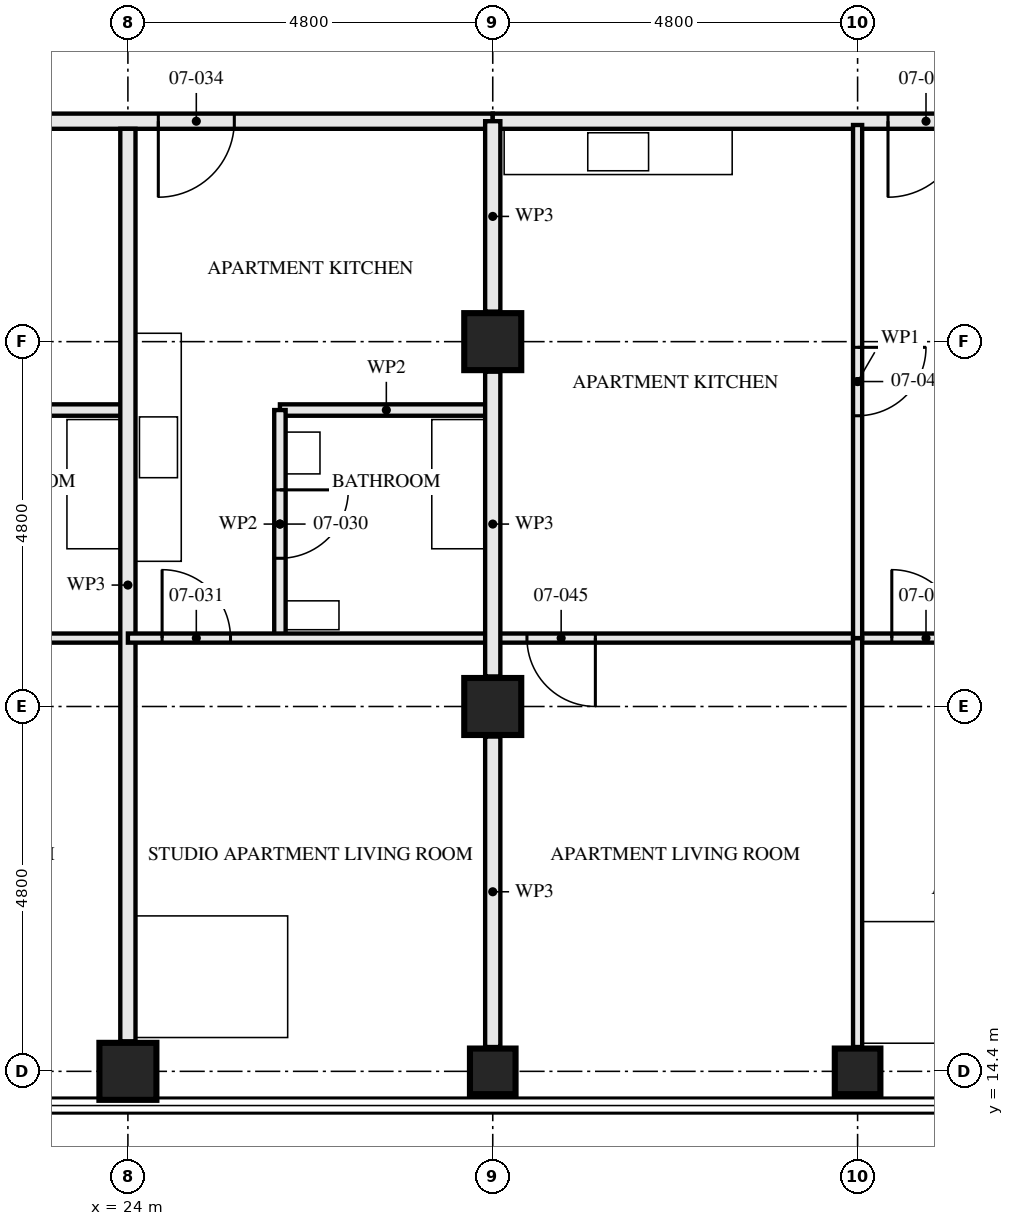
"""IFC4 building model, lengths in metres.
Left out: names, types, materials, properties, quantities, classifications, styles, units other than length and angle.
Written with IfcOpenShell. Run it as: python <this file> out.ifc"""

import sys

from ifc_helpers import new_model, si_unit, direction, frame, frame_2d, origin, origin_2d, place, context, subcontext, project, spatial, rectangle, hollow_rectangle, extrude, element, fill, save


model = new_model("IFC4")
c1 = context("Model", 3, precision=1e-05, world=origin(), true_north=direction((0.0, 1.0)))
c2 = subcontext(c1, "Body", "Model", "MODEL_VIEW")
j1 = project(units=[si_unit("LENGTHUNIT", "METRE"), si_unit("PLANEANGLEUNIT", "RADIAN")], contexts=[c1])
p1 = place(None, origin())
s1 = spatial("IfcSite", under=j1, at=p1, CompositionType="ELEMENT")
p2 = place(p1, origin())
s2 = spatial("IfcBuilding", under=s1, at=p2, CompositionType="ELEMENT")
p3 = place(p2, frame((0.0, 0.0, 30.5)))
s3 = spatial("IfcBuildingStorey", under=s2, at=p3, CompositionType="ELEMENT", Elevation=30.5)
p4 = place(p3, frame((24.0, 14.4, 0.0), z_axis=(0.0, 0.0, 1.0), x_axis=(0.0, 1.0, 0.0)))
e1 = element("IfcColumn", 1, at=p4, inside=s3, PredefinedType="COLUMN", context=c2, shape_type="SweptSolid", body=[
    extrude(hollow_rectangle(XDim=0.75, YDim=0.75, WallThickness=0.08, at=origin_2d()), origin(), (0.0, 0.0, 1.0), 3.5),
])
p5 = place(p3, frame((28.8, 14.4, 0.0), z_axis=(0.0, 0.0, 1.0), x_axis=(0.0, 1.0, 0.0)))
e2 = element("IfcColumn", 2, at=p5, inside=s3, PredefinedType="COLUMN", context=c2, shape_type="SweptSolid", body=[
    extrude(hollow_rectangle(XDim=0.6, YDim=0.6, WallThickness=0.08, at=origin_2d()), origin(), (0.0, 0.0, 1.0), 3.5),
])
for number, where, z_axis, x_axis in (
    (3, (28.8, 19.2, 0.0), (0.0, 0.0, 1.0), (1.0, 0.0, 0.0)),
    (4, (28.8, 24.0, 0.0), (0.0, 0.0, 1.0), (1.0, 0.0, 0.0)),
):
    element("IfcColumn", number, at=place(p3, frame(where, z_axis=z_axis, x_axis=x_axis)), inside=s3, PredefinedType="COLUMN", context=c2, shape_type="SweptSolid", body=[
        extrude(hollow_rectangle(XDim=0.75, YDim=0.75, WallThickness=0.08, at=origin_2d()), origin(), (0.0, 0.0, 1.0), 3.5),
    ])
p6 = place(p3, frame((33.6, 14.4, 0.0), z_axis=(0.0, 0.0, 1.0), x_axis=(0.0, 1.0, 0.0)))
e5 = element("IfcColumn", 5, at=p6, inside=s3, PredefinedType="COLUMN", context=c2, shape_type="SweptSolid", body=[
    extrude(hollow_rectangle(XDim=0.6, YDim=0.6, WallThickness=0.08, at=origin_2d()), origin(), (0.0, 0.0, 1.0), 3.5),
])
p7 = place(p3, frame((21.2, 23.1, 0.0), z_axis=(0.0, 0.0, 1.0), x_axis=(1.0, 0.0, 0.0)))
e6 = element("IfcWall", 6, at=p7, inside=s3, PredefinedType="PARTITIONING", context=c2, shape_type="SweptSolid", body=[
    extrude(rectangle(XDim=2.8, YDim=0.15, at=frame_2d((1.4, 0.0))), origin(), (0.0, 0.0, 1.0), 3.33),
])
p8 = place(p3, frame((19.2, 20.1, 0.0), z_axis=(0.0, 0.0, 1.0), x_axis=(1.0, 0.0, 0.0)))
e7 = element("IfcWall", 7, at=p8, inside=s3, PredefinedType="PARTITIONING", context=c2, shape_type="SweptSolid", body=[
    extrude(rectangle(XDim=4.8, YDim=0.12, at=frame_2d((2.4, 0.0))), origin(), (0.0, 0.0, 1.0), 3.33),
])
p9 = place(p8, frame((0.45, 0.0, 0.0)))
e8 = element("IfcOpeningElement", 8, at=p9, cuts=e7, PredefinedType="OPENING", context=c2, shape_type="SweptSolid", body=[
    extrude(rectangle(XDim=0.9, YDim=2.1, at=frame_2d((0.45, 1.05))), frame((0.0, 0.071, 0.0), z_axis=(0.0, -1.0, 0.0), x_axis=(1.0, 0.0, 0.0)), (0.0, 0.0, 1.0), 0.141),
])
p10 = place(p3, frame((24.0, 14.795, 0.0), z_axis=(0.0, 0.0, 1.0), x_axis=(0.0, 1.0, 0.0)))
e9 = element("IfcWall", 9, at=p10, inside=s3, PredefinedType="PARTITIONING", context=c2, shape_type="SweptSolid", body=[
    extrude(rectangle(XDim=12.005, YDim=0.2, at=frame_2d((6.002, 0.0))), origin(), (0.0, 0.0, 1.0), 2.55),
])
p11 = place(p3, frame((26.0, 20.1, 0.0), z_axis=(0.0, 0.0, 1.0), x_axis=(0.0, 1.0, 0.0)))
e10 = element("IfcWall", 10, at=p11, inside=s3, PredefinedType="PARTITIONING", context=c2, shape_type="SweptSolid", body=[
    extrude(rectangle(XDim=3.0, YDim=0.15, at=frame_2d((1.5, 0.0))), origin(), (0.0, 0.0, 1.0), 3.33),
])
p12 = place(p11, frame((1.05, 0.0, 0.0)))
e11 = element("IfcOpeningElement", 11, at=p12, cuts=e10, PredefinedType="OPENING", context=c2, shape_type="SweptSolid", body=[
    extrude(rectangle(XDim=0.9, YDim=2.1, at=frame_2d((0.45, 1.05))), frame((0.0, 0.085, 0.0), z_axis=(0.0, -1.0, 0.0), x_axis=(1.0, 0.0, 0.0)), (0.0, 0.0, 1.0), 0.171),
])
p13 = place(p3, frame((26.0, 23.1, 0.0), z_axis=(0.0, 0.0, 1.0), x_axis=(1.0, 0.0, 0.0)))
e12 = element("IfcWall", 12, at=p13, inside=s3, PredefinedType="PARTITIONING", context=c2, shape_type="SweptSolid", body=[
    extrude(rectangle(XDim=2.8, YDim=0.15, at=frame_2d((1.4, 0.0))), origin(), (0.0, 0.0, 1.0), 3.33),
])
p14 = place(p3, frame((24.0, 20.1, 0.0), z_axis=(0.0, 0.0, 1.0), x_axis=(1.0, 0.0, 0.0)))
e13 = element("IfcWall", 13, at=p14, inside=s3, PredefinedType="PARTITIONING", context=c2, shape_type="SweptSolid", body=[
    extrude(rectangle(XDim=4.8, YDim=0.12, at=frame_2d((2.4, 0.0))), origin(), (0.0, 0.0, 1.0), 3.33),
])
p15 = place(p14, frame((0.45, 0.0, 0.0)))
e14 = element("IfcOpeningElement", 14, at=p15, cuts=e13, PredefinedType="OPENING", context=c2, shape_type="SweptSolid", body=[
    extrude(rectangle(XDim=0.9, YDim=2.1, at=frame_2d((0.45, 1.05))), frame((0.0, 0.071, 0.0), z_axis=(0.0, -1.0, 0.0), x_axis=(1.0, 0.0, 0.0)), (0.0, 0.0, 1.0), 0.141),
])
p16 = place(p3, frame((14.4, 26.9, 0.0), z_axis=(0.0, 0.0, 1.0), x_axis=(1.0, 0.0, 0.0)))
e15 = element("IfcWall", 15, at=p16, inside=s3, PredefinedType="PARTITIONING", context=c2, shape_type="SweptSolid", body=[
    extrude(rectangle(XDim=14.4, YDim=0.2, at=frame_2d((7.2, 0.0))), origin(), (0.0, 0.0, 1.0), 2.55),
])
p17 = place(p16, frame((1.4, 0.0, 0.0)))
e16 = element("IfcOpeningElement", 16, at=p17, cuts=e15, PredefinedType="OPENING", context=c2, shape_type="SweptSolid", body=[
    extrude(rectangle(XDim=1.0, YDim=2.1, at=frame_2d((0.5, 1.05))), frame((0.0, 0.111, 0.0), z_axis=(0.0, -1.0, 0.0), x_axis=(1.0, 0.0, 0.0)), (0.0, 0.0, 1.0), 0.221),
])
p18 = place(p16, frame((5.2, 0.0, 0.0)))
e17 = element("IfcOpeningElement", 17, at=p18, cuts=e15, PredefinedType="OPENING", context=c2, shape_type="SweptSolid", body=[
    extrude(rectangle(XDim=1.0, YDim=2.1, at=frame_2d((0.5, 1.05))), frame((0.0, 0.111, 0.0), z_axis=(0.0, -1.0, 0.0), x_axis=(1.0, 0.0, 0.0)), (0.0, 0.0, 1.0), 0.221),
])
p19 = place(p16, frame((10.0, 0.0, 0.0)))
e18 = element("IfcOpeningElement", 18, at=p19, cuts=e15, PredefinedType="OPENING", context=c2, shape_type="SweptSolid", body=[
    extrude(rectangle(XDim=1.0, YDim=2.1, at=frame_2d((0.5, 1.05))), frame((0.0, 0.111, 0.0), z_axis=(0.0, -1.0, 0.0), x_axis=(1.0, 0.0, 0.0)), (0.0, 0.0, 1.0), 0.221),
])
p20 = place(p3, frame((33.6, 20.1, 0.0), z_axis=(0.0, 0.0, 1.0), x_axis=(0.0, 1.0, 0.0)))
e19 = element("IfcWall", 19, at=p20, inside=s3, PredefinedType="PARTITIONING", context=c2, shape_type="SweptSolid", body=[
    extrude(rectangle(XDim=6.75, YDim=0.12, at=frame_2d((3.375, 0.0))), origin(), (0.0, 0.0, 1.0), 2.55),
])
p21 = place(p20, frame((2.925, 0.0, 0.0)))
e20 = element("IfcOpeningElement", 20, at=p21, cuts=e19, PredefinedType="OPENING", context=c2, shape_type="SweptSolid", body=[
    extrude(rectangle(XDim=0.9, YDim=2.1, at=frame_2d((0.45, 1.05))), frame((0.0, 0.071, 0.0), z_axis=(0.0, -1.0, 0.0), x_axis=(1.0, 0.0, 0.0)), (0.0, 0.0, 1.0), 0.141),
])
p22 = place(p3, frame((28.8, 20.1, 0.0), z_axis=(0.0, 0.0, 1.0), x_axis=(1.0, 0.0, 0.0)))
e21 = element("IfcWall", 21, at=p22, inside=s3, PredefinedType="PARTITIONING", context=c2, shape_type="SweptSolid", body=[
    extrude(rectangle(XDim=4.8, YDim=0.12, at=frame_2d((2.4, 0.0))), origin(), (0.0, 0.0, 1.0), 3.33),
])
p23 = place(p22, frame((0.45, 0.0, 0.0)))
e22 = element("IfcOpeningElement", 22, at=p23, cuts=e21, PredefinedType="OPENING", context=c2, shape_type="SweptSolid", body=[
    extrude(rectangle(XDim=0.9, YDim=2.1, at=frame_2d((0.45, 1.05))), frame((0.0, 0.071, 0.0), z_axis=(0.0, -1.0, 0.0), x_axis=(1.0, 0.0, 0.0)), (0.0, 0.0, 1.0), 0.141),
])
p24 = place(p3, frame((33.6, 20.1, 0.0), z_axis=(0.0, 0.0, 1.0), x_axis=(1.0, 0.0, 0.0)))
e23 = element("IfcWall", 23, at=p24, inside=s3, PredefinedType="PARTITIONING", context=c2, shape_type="SweptSolid", body=[
    extrude(rectangle(XDim=4.8, YDim=0.12, at=frame_2d((2.4, 0.0))), origin(), (0.0, 0.0, 1.0), 3.33),
])
p25 = place(p24, frame((0.45, 0.0, 0.0)))
e24 = element("IfcOpeningElement", 24, at=p25, cuts=e23, PredefinedType="OPENING", context=c2, shape_type="SweptSolid", body=[
    extrude(rectangle(XDim=0.9, YDim=2.1, at=frame_2d((0.45, 1.05))), frame((0.0, 0.071, 0.0), z_axis=(0.0, -1.0, 0.0), x_axis=(1.0, 0.0, 0.0)), (0.0, 0.0, 1.0), 0.141),
])
p26 = place(p3, frame((33.6, 14.72, 0.0), z_axis=(0.0, 0.0, 1.0), x_axis=(0.0, 1.0, 0.0)))
e25 = element("IfcWall", 25, at=p26, inside=s3, PredefinedType="PARTITIONING", context=c2, shape_type="SweptSolid", body=[
    extrude(rectangle(XDim=5.38, YDim=0.12, at=frame_2d((2.69, 0.0))), origin(), (0.0, 0.0, 1.0), 2.55),
])
p27 = place(p3, frame((28.8, 26.9, 0.0), z_axis=(0.0, 0.0, 1.0), x_axis=(1.0, 0.0, 0.0)))
e26 = element("IfcWall", 26, at=p27, inside=s3, PredefinedType="PARTITIONING", context=c2, shape_type="SweptSolid", body=[
    extrude(rectangle(XDim=9.6, YDim=0.2, at=frame_2d((4.8, 0.0))), origin(), (0.0, 0.0, 1.0), 3.33),
])
p28 = place(p27, frame((5.2, 0.0, 0.0)))
e27 = element("IfcOpeningElement", 27, at=p28, cuts=e26, PredefinedType="OPENING", context=c2, shape_type="SweptSolid", body=[
    extrude(rectangle(XDim=1.0, YDim=2.1, at=frame_2d((0.5, 1.05))), frame((0.0, 0.111, 0.0), z_axis=(0.0, -1.0, 0.0), x_axis=(1.0, 0.0, 0.0)), (0.0, 0.0, 1.0), 0.221),
])
p29 = place(p3, frame((28.8, 14.72, 0.0), z_axis=(0.0, 0.0, 1.0), x_axis=(0.0, 1.0, 0.0)))
e28 = element("IfcWall", 28, at=p29, inside=s3, PredefinedType="PARTITIONING", context=c2, shape_type="SweptSolid", body=[
    extrude(rectangle(XDim=4.085, YDim=0.2, at=frame_2d((2.042, 0.0))), origin(), (0.0, 0.0, 1.0), 2.32),
])
p30 = place(p3, frame((28.8, 19.595, 0.0), z_axis=(0.0, 0.0, 1.0), x_axis=(0.0, 1.0, 0.0)))
e29 = element("IfcWall", 29, at=p30, inside=s3, PredefinedType="PARTITIONING", context=c2, shape_type="SweptSolid", body=[
    extrude(rectangle(XDim=4.01, YDim=0.2, at=frame_2d((2.005, 0.0))), origin(), (0.0, 0.0, 1.0), 2.32),
])
p31 = place(p3, frame((28.8, 24.395, 0.0), z_axis=(0.0, 0.0, 1.0), x_axis=(0.0, 1.0, 0.0)))
e30 = element("IfcWall", 30, at=p31, inside=s3, PredefinedType="PARTITIONING", context=c2, shape_type="SweptSolid", body=[
    extrude(rectangle(XDim=2.505, YDim=0.2, at=frame_2d((1.252, 0.0))), origin(), (0.0, 0.0, 1.0), 2.32),
])
p32 = place(p12, frame((0.9, 0.0, 0.0), z_axis=(0.0, 0.0, 1.0), x_axis=(-1.0, 0.0, 0.0)))
e31 = element("IfcDoor", 31, at=p32, inside=s3, OperationType="SINGLE_SWING_RIGHT", PredefinedType="DOOR", context=c2, shape_type="SweptSolid", body=[
    extrude(rectangle(XDim=0.9, YDim=2.1, at=frame_2d((0.45, 1.05))), frame((0.0, 0.022, 0.0), z_axis=(0.0, -1.0, 0.0), x_axis=(1.0, 0.0, 0.0)), (0.0, 0.0, 1.0), 0.044),
])
fill(e11, e31)
p33 = place(p15, origin())
e32 = element("IfcDoor", 32, at=p33, inside=s3, OperationType="SINGLE_SWING_RIGHT", PredefinedType="DOOR", context=c2, shape_type="SweptSolid", body=[
    extrude(rectangle(XDim=0.9, YDim=2.1, at=frame_2d((0.45, 1.05))), frame((0.0, 0.022, 0.0), z_axis=(0.0, -1.0, 0.0), x_axis=(1.0, 0.0, 0.0)), (0.0, 0.0, 1.0), 0.044),
])
fill(e14, e32)
p34 = place(p19, frame((1.0, 0.0, 0.0), z_axis=(0.0, 0.0, 1.0), x_axis=(-1.0, 0.0, 0.0)))
e33 = element("IfcDoor", 33, at=p34, inside=s3, OperationType="SINGLE_SWING_LEFT", PredefinedType="DOOR", context=c2, shape_type="SweptSolid", body=[
    extrude(rectangle(XDim=1.0, YDim=2.1, at=frame_2d((0.5, 1.05))), frame((0.0, 0.027, 0.0), z_axis=(0.0, -1.0, 0.0), x_axis=(1.0, 0.0, 0.0)), (0.0, 0.0, 1.0), 0.054),
])
fill(e18, e33)
p35 = place(p21, frame((0.9, 0.0, 0.0), z_axis=(0.0, 0.0, 1.0), x_axis=(-1.0, 0.0, 0.0)))
e34 = element("IfcDoor", 34, at=p35, inside=s3, OperationType="SINGLE_SWING_RIGHT", PredefinedType="DOOR", context=c2, shape_type="SweptSolid", body=[
    extrude(rectangle(XDim=0.9, YDim=2.1, at=frame_2d((0.45, 1.05))), frame((0.0, 0.022, 0.0), z_axis=(0.0, -1.0, 0.0), x_axis=(1.0, 0.0, 0.0)), (0.0, 0.0, 1.0), 0.044),
])
fill(e20, e34)
p36 = place(p23, frame((0.9, 0.0, 0.0), z_axis=(0.0, 0.0, 1.0), x_axis=(-1.0, 0.0, 0.0)))
e35 = element("IfcDoor", 35, at=p36, inside=s3, OperationType="SINGLE_SWING_RIGHT", PredefinedType="DOOR", context=c2, shape_type="SweptSolid", body=[
    extrude(rectangle(XDim=0.9, YDim=2.1, at=frame_2d((0.45, 1.05))), frame((0.0, 0.022, 0.0), z_axis=(0.0, -1.0, 0.0), x_axis=(1.0, 0.0, 0.0)), (0.0, 0.0, 1.0), 0.044),
])
fill(e22, e35)
p37 = place(p25, origin())
e36 = element("IfcDoor", 36, at=p37, inside=s3, OperationType="SINGLE_SWING_RIGHT", PredefinedType="DOOR", context=c2, shape_type="SweptSolid", body=[
    extrude(rectangle(XDim=0.9, YDim=2.1, at=frame_2d((0.45, 1.05))), frame((0.0, 0.022, 0.0), z_axis=(0.0, -1.0, 0.0), x_axis=(1.0, 0.0, 0.0)), (0.0, 0.0, 1.0), 0.044),
])
fill(e24, e36)
p38 = place(p28, frame((1.0, 0.0, 0.0), z_axis=(0.0, 0.0, 1.0), x_axis=(-1.0, 0.0, 0.0)))
e37 = element("IfcDoor", 37, at=p38, inside=s3, OperationType="SINGLE_SWING_LEFT", PredefinedType="DOOR", context=c2, shape_type="SweptSolid", body=[
    extrude(rectangle(XDim=1.0, YDim=2.1, at=frame_2d((0.5, 1.05))), frame((0.0, 0.027, 0.0), z_axis=(0.0, -1.0, 0.0), x_axis=(1.0, 0.0, 0.0)), (0.0, 0.0, 1.0), 0.054),
])
fill(e27, e37)
save(model, sys.argv[1])
